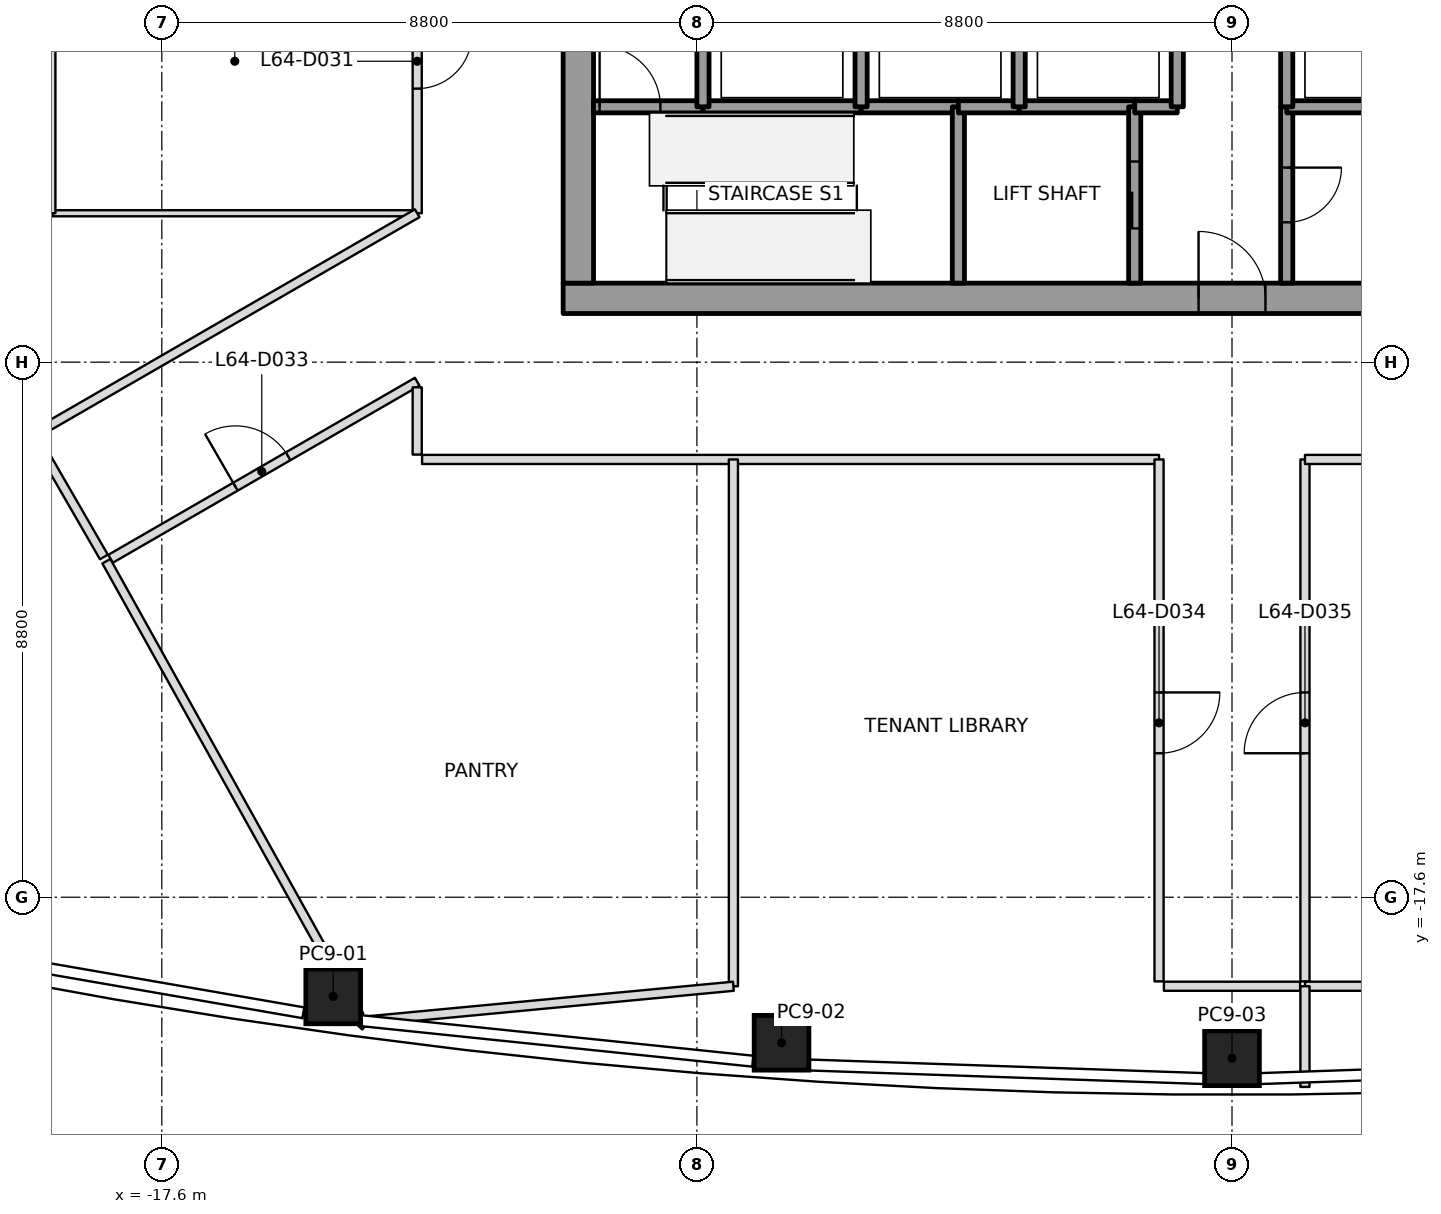
"""IFC4 building model, lengths in metres.
Left out: names, types, materials, properties, quantities, classifications, styles, units other than length and angle.
Written with IfcOpenShell. Run it as: python <this file> out.ifc"""

import sys

from ifc_helpers import new_model, si_unit, direction, frame, frame_2d, origin, origin_2d, place, context, subcontext, project, spatial, rectangle, extrude, element, fill, save


model = new_model("IFC4")
c1 = context("Model", 3, precision=1e-05, world=origin(), true_north=direction((0.0, 1.0)))
c2 = subcontext(c1, "Body", "Model", "MODEL_VIEW")
j1 = project(units=[si_unit("LENGTHUNIT", "METRE"), si_unit("PLANEANGLEUNIT", "RADIAN")], contexts=[c1])
p1 = place(None, origin())
s1 = spatial("IfcSite", under=j1, at=p1, CompositionType="ELEMENT")
p2 = place(p1, origin())
s2 = spatial("IfcBuilding", under=s1, at=p2, CompositionType="ELEMENT")
p3 = place(p2, frame((0.0, 0.0, 283.0)))
s3 = spatial("IfcBuildingStorey", under=s2, at=p3, CompositionType="ELEMENT", Elevation=283.0)
p4 = place(p3, frame((-14.781, -19.231, 0.0), z_axis=(0.017452445502, 0.010434853779, 0.999793241612), x_axis=(-0.990413210435, 0.137223335577, 0.015856505603)))
e1 = element("IfcColumn", 1, at=p4, inside=s3, PredefinedType="COLUMN", context=c2, shape_type="SweptSolid", body=[
    extrude(rectangle(XDim=0.9, YDim=0.9, at=origin_2d()), origin(), (0.0, 0.0, 1.0), 4.001),
])
p5 = place(p3, frame((-7.408, -19.994, 0.0), z_axis=(0.008788174922, 0.01116830563, 0.999899013366), x_axis=(-0.997599705176, 0.068781048985, 0.0079997208)))
e2 = element("IfcColumn", 2, at=p5, inside=s3, PredefinedType="COLUMN", context=c2, shape_type="SweptSolid", body=[
    extrude(rectangle(XDim=0.9, YDim=0.9, at=origin_2d()), origin(), (0.0, 0.0, 1.0), 4.0),
])
p6 = place(p3, frame((0.0, -20.249, 0.0), z_axis=(0.0, 0.01141283087, 0.999934871525), x_axis=(1.0, 0.0, 0.0)))
e3 = element("IfcColumn", 3, at=p6, inside=s3, PredefinedType="COLUMN", context=c2, shape_type="SweptSolid", body=[
    extrude(rectangle(XDim=0.9, YDim=0.9, at=origin_2d()), origin(), (0.0, 0.0, 1.0), 4.0),
])
p7 = place(p3, frame((-11.0, -7.75, 0.0), z_axis=(0.0, 0.0, 1.0), x_axis=(1.0, 0.0, 0.0)))
e4 = element("IfcWall", 4, at=p7, inside=s3, PredefinedType="SHEAR", context=c2, shape_type="SweptSolid", body=[
    extrude(rectangle(XDim=22.0, YDim=0.5, at=frame_2d((11.0, 0.0))), origin(), (0.0, 0.0, 1.0), 4.0),
])
p8 = place(p7, frame((10.45, 0.0, 0.0)))
e5 = element("IfcOpeningElement", 5, at=p8, cuts=e4, PredefinedType="OPENING", context=c2, shape_type="SweptSolid", body=[
    extrude(rectangle(XDim=1.1, YDim=2.1, at=frame_2d((0.55, 1.05))), frame((0.0, 0.25, 0.0), z_axis=(0.0, -1.0, 0.0), x_axis=(1.0, 0.0, 0.0)), (0.0, 0.0, 1.0), 0.5),
])
p9 = place(p3, frame((-10.75, -7.5, 0.0), z_axis=(0.0, 0.0, 1.0), x_axis=(0.0, 1.0, 0.0)))
e6 = element("IfcWall", 6, at=p9, inside=s3, PredefinedType="SHEAR", context=c2, shape_type="SweptSolid", body=[
    extrude(rectangle(XDim=15.0, YDim=0.5, at=frame_2d((7.5, 0.0))), origin(), (0.0, 0.0, 1.0), 4.0),
])
p10 = place(p9, frame((6.6, 0.0, 0.0)))
e7 = element("IfcOpeningElement", 7, at=p10, cuts=e6, PredefinedType="OPENING", context=c2, shape_type="SweptSolid", body=[
    extrude(rectangle(XDim=1.8, YDim=2.1, at=frame_2d((0.9, 1.05))), frame((0.0, 0.25, 0.0), z_axis=(0.0, -1.0, 0.0), x_axis=(1.0, 0.0, 0.0)), (0.0, 0.0, 1.0), 0.5),
])
p11 = place(p3, frame((-10.5, -4.6, 0.0), z_axis=(0.0, 0.0, 1.0), x_axis=(1.0, 0.0, 0.0)))
e8 = element("IfcWall", 8, at=p11, inside=s3, PredefinedType="SOLIDWALL", context=c2, shape_type="SweptSolid", body=[
    extrude(rectangle(XDim=1.8, YDim=0.2, at=frame_2d((0.9, 0.0))), origin(), (0.0, 0.0, 1.0), 3.85),
])
p12 = place(p11, frame((0.1, 0.0, 0.0)))
e9 = element("IfcOpeningElement", 9, at=p12, cuts=e8, PredefinedType="OPENING", context=c2, shape_type="SweptSolid", body=[
    extrude(rectangle(XDim=1.0, YDim=2.1, at=frame_2d((0.5, 1.05))), frame((0.0, 0.1, 0.0), z_axis=(0.0, -1.0, 0.0), x_axis=(1.0, 0.0, 0.0)), (0.0, 0.0, 1.0), 0.2),
])
p13 = place(p3, frame((-8.7, -4.6, 0.0), z_axis=(0.0, 0.0, 1.0), x_axis=(1.0, 0.0, 0.0)))
e10 = element("IfcWall", 10, at=p13, inside=s3, PredefinedType="SOLIDWALL", context=c2, shape_type="SweptSolid", body=[
    extrude(rectangle(XDim=2.6, YDim=0.2, at=frame_2d((1.3, 0.0))), origin(), (0.0, 0.0, 1.0), 3.85),
])
p14 = place(p3, frame((-8.7, -4.6, 0.0), z_axis=(0.0, 0.0, 1.0), x_axis=(0.0, 1.0, 0.0)))
e11 = element("IfcWall", 11, at=p14, inside=s3, PredefinedType="SOLIDWALL", context=c2, shape_type="SweptSolid", body=[
    extrude(rectangle(XDim=2.8, YDim=0.2, at=frame_2d((1.4, 0.0))), origin(), (0.0, 0.0, 1.0), 3.85),
])
p15 = place(p3, frame((-6.1, -4.6, 0.0), z_axis=(0.0, 0.0, 1.0), x_axis=(1.0, 0.0, 0.0)))
e12 = element("IfcWall", 12, at=p15, inside=s3, PredefinedType="SOLIDWALL", context=c2, shape_type="SweptSolid", body=[
    extrude(rectangle(XDim=1.6, YDim=0.2, at=frame_2d((0.8, 0.0))), origin(), (0.0, 0.0, 1.0), 3.85),
])
p16 = place(p3, frame((-6.1, -4.6, 0.0), z_axis=(0.0, 0.0, 1.0), x_axis=(0.0, 1.0, 0.0)))
e13 = element("IfcWall", 13, at=p16, inside=s3, PredefinedType="SOLIDWALL", context=c2, shape_type="SweptSolid", body=[
    extrude(rectangle(XDim=2.8, YDim=0.2, at=frame_2d((1.4, 0.0))), origin(), (0.0, 0.0, 1.0), 3.85),
])
p17 = place(p3, frame((-4.5, -4.6, 0.0), z_axis=(0.0, 0.0, 1.0), x_axis=(0.0, -1.0, 0.0)))
e14 = element("IfcWall", 14, at=p17, inside=s3, PredefinedType="SOLIDWALL", context=c2, shape_type="SweptSolid", body=[
    extrude(rectangle(XDim=2.9, YDim=0.2, at=frame_2d((1.45, 0.0))), origin(), (0.0, 0.0, 1.0), 3.85),
])
p18 = place(p3, frame((-4.5, -4.6, 0.0), z_axis=(0.0, 0.0, 1.0), x_axis=(1.0, 0.0, 0.0)))
e15 = element("IfcWall", 15, at=p18, inside=s3, PredefinedType="SOLIDWALL", context=c2, shape_type="SweptSolid", body=[
    extrude(rectangle(XDim=1.0, YDim=0.2, at=frame_2d((0.5, 0.0))), origin(), (0.0, 0.0, 1.0), 3.85),
])
p19 = place(p3, frame((-3.5, -4.6, 0.0), z_axis=(0.0, 0.0, 1.0), x_axis=(1.0, 0.0, 0.0)))
e16 = element("IfcWall", 16, at=p19, inside=s3, PredefinedType="SOLIDWALL", context=c2, shape_type="SweptSolid", body=[
    extrude(rectangle(XDim=1.9, YDim=0.2, at=frame_2d((0.95, 0.0))), origin(), (0.0, 0.0, 1.0), 3.85),
])
p20 = place(p3, frame((-3.5, -4.6, 0.0), z_axis=(0.0, 0.0, 1.0), x_axis=(0.0, 1.0, 0.0)))
e17 = element("IfcWall", 17, at=p20, inside=s3, PredefinedType="SOLIDWALL", context=c2, shape_type="SweptSolid", body=[
    extrude(rectangle(XDim=2.8, YDim=0.2, at=frame_2d((1.4, 0.0))), origin(), (0.0, 0.0, 1.0), 3.85),
])
p21 = place(p3, frame((-1.6, -7.5, 0.0), z_axis=(0.0, 0.0, 1.0), x_axis=(0.0, 1.0, 0.0)))
e18 = element("IfcWall", 18, at=p21, inside=s3, PredefinedType="SOLIDWALL", context=c2, shape_type="SweptSolid", body=[
    extrude(rectangle(XDim=2.9, YDim=0.2, at=frame_2d((1.45, 0.0))), origin(), (0.0, 0.0, 1.0), 3.85),
])
p22 = place(p21, frame((0.9, 0.0, 0.0)))
e19 = element("IfcOpeningElement", 19, at=p22, cuts=e18, PredefinedType="OPENING", context=c2, shape_type="SweptSolid", body=[
    extrude(rectangle(XDim=1.1, YDim=2.1, at=frame_2d((0.55, 1.05))), frame((0.0, 0.1, 0.0), z_axis=(0.0, -1.0, 0.0), x_axis=(1.0, 0.0, 0.0)), (0.0, 0.0, 1.0), 0.2),
])
p23 = place(p3, frame((-1.6, -4.6, 0.0), z_axis=(0.0, 0.0, 1.0), x_axis=(1.0, 0.0, 0.0)))
e20 = element("IfcWall", 20, at=p23, inside=s3, PredefinedType="SOLIDWALL", context=c2, shape_type="SweptSolid", body=[
    extrude(rectangle(XDim=0.7, YDim=0.2, at=frame_2d((0.35, 0.0))), origin(), (0.0, 0.0, 1.0), 3.85),
])
p24 = place(p3, frame((-0.9, -4.6, 0.0), z_axis=(0.0, 0.0, 1.0), x_axis=(0.0, 1.0, 0.0)))
e21 = element("IfcWall", 21, at=p24, inside=s3, PredefinedType="SOLIDWALL", context=c2, shape_type="SweptSolid", body=[
    extrude(rectangle(XDim=2.8, YDim=0.2, at=frame_2d((1.4, 0.0))), origin(), (0.0, 0.0, 1.0), 3.85),
])
p25 = place(p3, frame((0.9, -4.6, 0.0), z_axis=(0.0, 0.0, 1.0), x_axis=(0.0, -1.0, 0.0)))
e22 = element("IfcWall", 22, at=p25, inside=s3, PredefinedType="SOLIDWALL", context=c2, shape_type="SweptSolid", body=[
    extrude(rectangle(XDim=2.9, YDim=0.2, at=frame_2d((1.45, 0.0))), origin(), (0.0, 0.0, 1.0), 3.85),
])
p26 = place(p25, frame((1.0, 0.0, 0.0)))
e23 = element("IfcOpeningElement", 23, at=p26, cuts=e22, PredefinedType="OPENING", context=c2, shape_type="SweptSolid", body=[
    extrude(rectangle(XDim=0.9, YDim=2.1, at=frame_2d((0.45, 1.05))), frame((0.0, 0.1, 0.0), z_axis=(0.0, -1.0, 0.0), x_axis=(1.0, 0.0, 0.0)), (0.0, 0.0, 1.0), 0.2),
])
p27 = place(p3, frame((3.5, -4.6, 0.0), z_axis=(0.0, 0.0, 1.0), x_axis=(-1.0, 0.0, 0.0)))
e24 = element("IfcWall", 24, at=p27, inside=s3, PredefinedType="SOLIDWALL", context=c2, shape_type="SweptSolid", body=[
    extrude(rectangle(XDim=2.6, YDim=0.2, at=frame_2d((1.3, 0.0))), origin(), (0.0, 0.0, 1.0), 3.85),
])
p28 = place(p3, frame((0.9, -1.8, 0.0), z_axis=(0.0, 0.0, 1.0), x_axis=(0.0, -1.0, 0.0)))
e25 = element("IfcWall", 25, at=p28, inside=s3, PredefinedType="SOLIDWALL", context=c2, shape_type="SweptSolid", body=[
    extrude(rectangle(XDim=2.8, YDim=0.2, at=frame_2d((1.4, 0.0))), origin(), (0.0, 0.0, 1.0), 3.85),
])
p29 = place(p3, frame((-18.512, -12.074, 0.0), z_axis=(0.0, 0.0, 1.0), x_axis=(0.486357878063, -0.873759700631, 0.0)))
e26 = element("IfcWall", 26, at=p29, inside=s3, PredefinedType="PARTITIONING", context=c2, shape_type="SweptSolid", body=[
    extrude(rectangle(XDim=8.551, YDim=0.15, at=frame_2d((4.276, 0.0))), origin(), (0.0, 0.0, 1.0), 3.45),
])
p30 = place(p3, frame((-8.2, -10.4, 0.0), z_axis=(0.0, 0.0, 1.0), x_axis=(0.0, -1.0, 0.0)))
e27 = element("IfcWall", 27, at=p30, inside=s3, PredefinedType="PARTITIONING", context=c2, shape_type="SweptSolid", body=[
    extrude(rectangle(XDim=8.664, YDim=0.15, at=frame_2d((4.332, 0.0))), origin(), (0.0, 0.0, 1.0), 3.45),
])
p31 = place(p3, frame((-8.2, -19.064, 0.0), z_axis=(0.0, 0.0, 1.0), x_axis=(-0.995555683818, -0.09417473344, 0.0)))
e28 = element("IfcWall", 28, at=p31, inside=s3, PredefinedType="PARTITIONING", context=c2, shape_type="SweptSolid", body=[
    extrude(rectangle(XDim=6.03, YDim=0.15, at=frame_2d((3.015, 0.0))), origin(), (0.0, 0.0, 1.0), 3.234),
])
p32 = place(p3, frame((-14.253, -19.719, 0.0), z_axis=(0.0, 0.0, 1.0), x_axis=(-0.743357981466, 0.668893796794, 0.0)))
e29 = element("IfcWall", 29, at=p32, inside=s3, PredefinedType="PARTITIONING", context=c2, shape_type="SweptSolid", body=[
    extrude(rectangle(XDim=0.19, YDim=0.15, at=frame_2d((0.095, 0.0))), origin(), (0.0, 0.0, 1.0), 3.45),
])
p33 = place(p3, frame((6.4, -19.064, 0.0), z_axis=(0.0, 0.0, 1.0), x_axis=(-1.0, 0.0, 0.0)))
e30 = element("IfcWall", 30, at=p33, inside=s3, PredefinedType="PARTITIONING", context=c2, shape_type="SweptSolid", body=[
    extrude(rectangle(XDim=5.2, YDim=0.15, at=frame_2d((2.6, 0.0))), origin(), (0.0, 0.0, 1.0), 3.393),
])
p34 = place(p3, frame((1.2, -19.064, 0.0), z_axis=(0.0, 0.0, 1.0), x_axis=(0.0, -1.0, 0.0)))
e31 = element("IfcWall", 31, at=p34, inside=s3, PredefinedType="PARTITIONING", context=c2, shape_type="SweptSolid", body=[
    extrude(rectangle(XDim=1.656, YDim=0.15, at=frame_2d((0.828, 0.0))), origin(), (0.0, 0.0, 1.0), 3.234),
])
p35 = place(p3, frame((-19.672, -10.064, 0.0), z_axis=(0.0, 0.0, 1.0), x_axis=(0.500030632641, -0.866007717299, 0.0)))
e32 = element("IfcWall", 32, at=p35, inside=s3, PredefinedType="PARTITIONING", context=c2, shape_type="SweptSolid", body=[
    extrude(rectangle(XDim=2.24, YDim=0.15, at=frame_2d((1.12, 0.0))), origin(), (0.0, 0.0, 1.0), 3.233),
])
p36 = place(p3, frame((-13.4, 6.351, 0.0), z_axis=(0.0, 0.0, 1.0), x_axis=(0.0, -1.0, 0.0)))
e33 = element("IfcWall", 33, at=p36, inside=s3, PredefinedType="PARTITIONING", context=c2, shape_type="SweptSolid", body=[
    extrude(rectangle(XDim=12.702, YDim=0.15, at=frame_2d((6.351, 0.0))), origin(), (0.0, 0.0, 1.0), 3.317),
])
p37 = place(p36, frame((9.752, 0.0, 0.0)))
e34 = element("IfcOpeningElement", 34, at=p37, cuts=e33, PredefinedType="OPENING", context=c2, shape_type="SweptSolid", body=[
    extrude(rectangle(XDim=0.9, YDim=2.1, at=frame_2d((0.45, 1.05))), frame((0.0, 0.075, 0.0), z_axis=(0.0, -1.0, 0.0), x_axis=(1.0, 0.0, 0.0)), (0.0, 0.0, 1.0), 0.15),
])
p38 = place(p36, frame((3.301, 0.0, 0.0)))
e35 = element("IfcOpeningElement", 35, at=p38, cuts=e33, PredefinedType="OPENING", context=c2, shape_type="SweptSolid", body=[
    extrude(rectangle(XDim=1.0, YDim=2.1, at=frame_2d((0.5, 1.05))), frame((0.0, 0.075, 0.0), z_axis=(0.0, -1.0, 0.0), x_axis=(1.0, 0.0, 0.0)), (0.0, 0.0, 1.0), 0.15),
])
p39 = place(p3, frame((-13.4, -6.351, 0.0), z_axis=(0.0, 0.0, 1.0), x_axis=(-0.866040084029, -0.499974572209, 0.0)))
e36 = element("IfcWall", 36, at=p39, inside=s3, PredefinedType="PARTITIONING", context=c2, shape_type="SweptSolid", body=[
    extrude(rectangle(XDim=7.209, YDim=0.15, at=frame_2d((3.604, 0.0))), origin(), (0.0, 0.0, 1.0), 3.317),
])
p40 = place(p3, frame((-18.443, -12.034, 0.0), z_axis=(0.0, 0.0, 1.0), x_axis=(0.866031294818, 0.499989796292, 0.0)))
e37 = element("IfcWall", 37, at=p40, inside=s3, PredefinedType="PARTITIONING", context=c2, shape_type="SweptSolid", body=[
    extrude(rectangle(XDim=5.823, YDim=0.15, at=frame_2d((2.912, 0.0))), origin(), (0.0, 0.0, 1.0), 3.233),
])
p41 = place(p40, frame((2.372, 0.0, 0.0)))
e38 = element("IfcOpeningElement", 38, at=p41, cuts=e37, PredefinedType="OPENING", context=c2, shape_type="SweptSolid", body=[
    extrude(rectangle(XDim=1.0, YDim=2.1, at=frame_2d((0.5, 1.05))), frame((0.0, 0.075, 0.0), z_axis=(0.0, -1.0, 0.0), x_axis=(1.0, 0.0, 0.0)), (0.0, 0.0, 1.0), 0.15),
])
p42 = place(p3, frame((-13.4, -9.214, 0.0), z_axis=(0.0, 0.0, 1.0), x_axis=(0.0, -1.0, 0.0)))
e39 = element("IfcWall", 39, at=p42, inside=s3, PredefinedType="PARTITIONING", context=c2, shape_type="SweptSolid", body=[
    extrude(rectangle(XDim=1.106, YDim=0.15, at=frame_2d((0.553, 0.0))), origin(), (0.0, 0.0, 1.0), 3.233),
])
p43 = place(p3, frame((-13.32, -10.4, 0.0), z_axis=(0.0, 0.0, 1.0), x_axis=(1.0, 0.0, 0.0)))
e40 = element("IfcWall", 40, at=p43, inside=s3, PredefinedType="PARTITIONING", context=c2, shape_type="SweptSolid", body=[
    extrude(rectangle(XDim=12.12, YDim=0.15, at=frame_2d((6.06, 0.0))), origin(), (0.0, 0.0, 1.0), 3.393),
])
p44 = place(p3, frame((-1.2, -10.4, 0.0), z_axis=(0.0, 0.0, 1.0), x_axis=(0.0, -1.0, 0.0)))
e41 = element("IfcWall", 41, at=p44, inside=s3, PredefinedType="PARTITIONING", context=c2, shape_type="SweptSolid", body=[
    extrude(rectangle(XDim=8.584, YDim=0.15, at=frame_2d((4.292, 0.0))), origin(), (0.0, 0.0, 1.0), 3.45),
])
p45 = place(p44, frame((3.832, 0.0, 0.0)))
e42 = element("IfcOpeningElement", 42, at=p45, cuts=e41, PredefinedType="OPENING", context=c2, shape_type="SweptSolid", body=[
    extrude(rectangle(XDim=1.0, YDim=2.1, at=frame_2d((0.5, 1.05))), frame((0.0, 0.075, 0.0), z_axis=(0.0, -1.0, 0.0), x_axis=(1.0, 0.0, 0.0)), (0.0, 0.0, 1.0), 0.15),
])
p46 = place(p3, frame((-1.12, -19.064, 0.0), z_axis=(0.0, 0.0, 1.0), x_axis=(1.0, 0.0, 0.0)))
e43 = element("IfcWall", 43, at=p46, inside=s3, PredefinedType="PARTITIONING", context=c2, shape_type="SweptSolid", body=[
    extrude(rectangle(XDim=2.24, YDim=0.15, at=frame_2d((1.12, 0.0))), origin(), (0.0, 0.0, 1.0), 3.45),
])
p47 = place(p3, frame((1.2, -18.984, 0.0), z_axis=(0.0, 0.0, 1.0), x_axis=(0.0, 1.0, 0.0)))
e44 = element("IfcWall", 44, at=p47, inside=s3, PredefinedType="PARTITIONING", context=c2, shape_type="SweptSolid", body=[
    extrude(rectangle(XDim=8.584, YDim=0.15, at=frame_2d((4.292, 0.0))), origin(), (0.0, 0.0, 1.0), 3.45),
])
p48 = place(p47, frame((3.752, 0.0, 0.0)))
e45 = element("IfcOpeningElement", 45, at=p48, cuts=e44, PredefinedType="OPENING", context=c2, shape_type="SweptSolid", body=[
    extrude(rectangle(XDim=1.0, YDim=2.1, at=frame_2d((0.5, 1.05))), frame((0.0, 0.075, 0.0), z_axis=(0.0, -1.0, 0.0), x_axis=(1.0, 0.0, 0.0)), (0.0, 0.0, 1.0), 0.15),
])
p49 = place(p3, frame((1.2, -10.4, 0.0), z_axis=(0.0, 0.0, 1.0), x_axis=(1.0, 0.0, 0.0)))
e46 = element("IfcWall", 46, at=p49, inside=s3, PredefinedType="PARTITIONING", context=c2, shape_type="SweptSolid", body=[
    extrude(rectangle(XDim=12.12, YDim=0.15, at=frame_2d((6.06, 0.0))), origin(), (0.0, 0.0, 1.0), 3.393),
])
p50 = place(p49, frame((6.85, 0.0, 0.0)))
e47 = element("IfcOpeningElement", 47, at=p50, cuts=e46, PredefinedType="OPENING", context=c2, shape_type="SweptSolid", body=[
    extrude(rectangle(XDim=0.9, YDim=2.1, at=frame_2d((0.45, 1.05))), frame((0.0, 0.075, 0.0), z_axis=(0.0, -1.0, 0.0), x_axis=(1.0, 0.0, 0.0)), (0.0, 0.0, 1.0), 0.15),
])
p51 = place(p49, frame((10.35, 0.0, 0.0)))
e48 = element("IfcOpeningElement", 48, at=p51, cuts=e46, PredefinedType="OPENING", context=c2, shape_type="SweptSolid", body=[
    extrude(rectangle(XDim=1.0, YDim=2.1, at=frame_2d((0.5, 1.05))), frame((0.0, 0.075, 0.0), z_axis=(0.0, -1.0, 0.0), x_axis=(1.0, 0.0, 0.0)), (0.0, 0.0, 1.0), 0.15),
])
p52 = place(p3, frame((-13.46, -6.351, 0.0), z_axis=(0.0, 0.0, 1.0), x_axis=(-1.0, 0.0, 0.0)))
e49 = element("IfcWall", 49, at=p52, inside=s3, PredefinedType="PARTITIONING", context=c2, shape_type="SweptSolid", body=[
    extrude(rectangle(XDim=5.94, YDim=0.1, at=frame_2d((2.97, 0.0))), origin(), (0.0, 0.0, 1.0), 3.317),
])
p53 = place(p3, frame((-19.4, -6.351, 0.0), z_axis=(0.0, 0.0, 1.0), x_axis=(0.0, 1.0, 0.0)))
e50 = element("IfcWall", 50, at=p53, inside=s3, PredefinedType="PARTITIONING", context=c2, shape_type="SweptSolid", body=[
    extrude(rectangle(XDim=5.0, YDim=0.1, at=frame_2d((2.5, 0.0))), origin(), (0.0, 0.0, 1.0), 3.317),
])
p54 = place(p37, origin())
e51 = element("IfcDoor", 51, at=p54, inside=s3, OperationType="SINGLE_SWING_LEFT", PredefinedType="DOOR", context=c2, shape_type="SweptSolid", body=[
    extrude(rectangle(XDim=0.9, YDim=2.1, at=frame_2d((0.45, 1.05))), frame((0.0, 0.025, 0.0), z_axis=(0.0, -1.0, 0.0), x_axis=(1.0, 0.0, 0.0)), (0.0, 0.0, 1.0), 0.05),
])
fill(e34, e51)
p55 = place(p41, origin())
e52 = element("IfcDoor", 52, at=p55, inside=s3, OperationType="SINGLE_SWING_LEFT", PredefinedType="DOOR", context=c2, shape_type="SweptSolid", body=[
    extrude(rectangle(XDim=1.0, YDim=2.1, at=frame_2d((0.5, 1.05))), frame((0.0, 0.025, 0.0), z_axis=(0.0, -1.0, 0.0), x_axis=(1.0, 0.0, 0.0)), (0.0, 0.0, 1.0), 0.05),
])
fill(e38, e52)
p56 = place(p45, origin())
e53 = element("IfcDoor", 53, at=p56, inside=s3, OperationType="SINGLE_SWING_RIGHT", PredefinedType="DOOR", context=c2, shape_type="SweptSolid", body=[
    extrude(rectangle(XDim=1.0, YDim=2.1, at=frame_2d((0.5, 1.05))), frame((0.0, 0.025, 0.0), z_axis=(0.0, -1.0, 0.0), x_axis=(1.0, 0.0, 0.0)), (0.0, 0.0, 1.0), 0.05),
])
fill(e42, e53)
p57 = place(p48, origin())
e54 = element("IfcDoor", 54, at=p57, inside=s3, OperationType="SINGLE_SWING_LEFT", PredefinedType="DOOR", context=c2, shape_type="SweptSolid", body=[
    extrude(rectangle(XDim=1.0, YDim=2.1, at=frame_2d((0.5, 1.05))), frame((0.0, 0.025, 0.0), z_axis=(0.0, -1.0, 0.0), x_axis=(1.0, 0.0, 0.0)), (0.0, 0.0, 1.0), 0.05),
])
fill(e45, e54)
p58 = place(p22, origin())
e55 = element("IfcDoor", 55, at=p58, inside=s3, OperationType="SLIDING_TO_RIGHT", PredefinedType="DOOR", context=c2, shape_type="SweptSolid", body=[
    extrude(rectangle(XDim=1.1, YDim=2.1, at=frame_2d((0.55, 1.05))), frame((0.0, 0.025, 0.0), z_axis=(0.0, -1.0, 0.0), x_axis=(1.0, 0.0, 0.0)), (0.0, 0.0, 1.0), 0.05),
])
fill(e19, e55)
p59 = place(p12, origin())
e56 = element("IfcDoor", 56, at=p59, inside=s3, OperationType="SINGLE_SWING_LEFT", PredefinedType="DOOR", context=c2, shape_type="SweptSolid", body=[
    extrude(rectangle(XDim=1.0, YDim=2.1, at=frame_2d((0.5, 1.05))), frame((0.0, 0.025, 0.0), z_axis=(0.0, -1.0, 0.0), x_axis=(1.0, 0.0, 0.0)), (0.0, 0.0, 1.0), 0.05),
])
fill(e9, e56)
p60 = place(p26, origin())
e57 = element("IfcDoor", 57, at=p60, inside=s3, OperationType="SINGLE_SWING_RIGHT", PredefinedType="DOOR", context=c2, shape_type="SweptSolid", body=[
    extrude(rectangle(XDim=0.9, YDim=2.1, at=frame_2d((0.45, 1.05))), frame((0.0, 0.025, 0.0), z_axis=(0.0, -1.0, 0.0), x_axis=(1.0, 0.0, 0.0)), (0.0, 0.0, 1.0), 0.05),
])
fill(e23, e57)
p61 = place(p8, origin())
e58 = element("IfcDoor", 58, at=p61, inside=s3, OperationType="SINGLE_SWING_LEFT", PredefinedType="DOOR", context=c2, shape_type="SweptSolid", body=[
    extrude(rectangle(XDim=1.1, YDim=2.1, at=frame_2d((0.55, 1.05))), frame((0.0, 0.025, 0.0), z_axis=(0.0, -1.0, 0.0), x_axis=(1.0, 0.0, 0.0)), (0.0, 0.0, 1.0), 0.05),
])
fill(e5, e58)
save(model, sys.argv[1])
